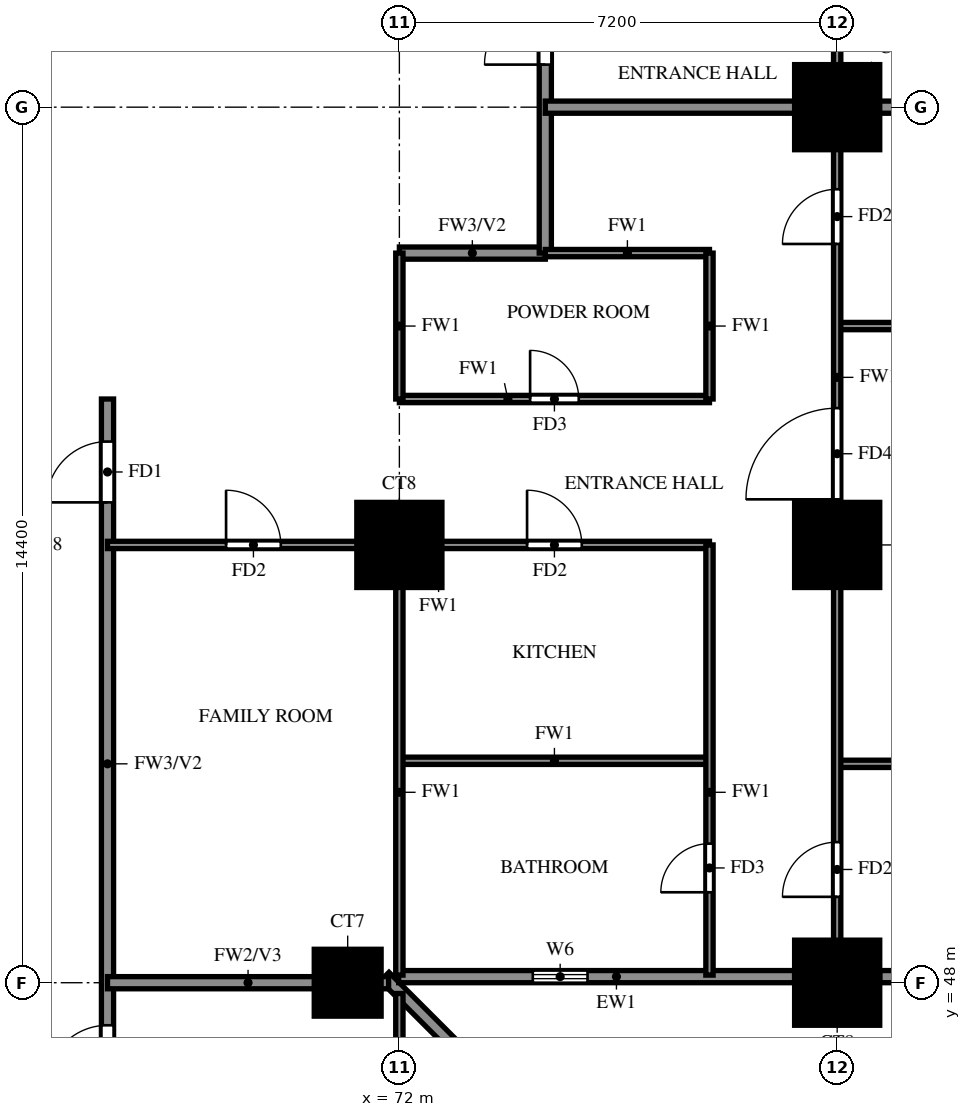
"""IFC4 building model, lengths in metres.
Left out: names, types, materials, properties, quantities, classifications, styles, units other than length and angle.
Written with IfcOpenShell. Run it as: python <this file> out.ifc"""

import sys

from ifc_helpers import new_model, si_unit, direction, frame, frame_2d, origin, origin_2d, place, context, subcontext, project, spatial, rectangle, extrude, source, transform, mapped, element, fill, save


model = new_model("IFC4")
c1 = context("Model", 3, precision=1e-05, world=origin(), true_north=direction((0.0, 1.0)))
c2 = subcontext(c1, "Body", "Model", "MODEL_VIEW")
j1 = project(units=[si_unit("LENGTHUNIT", "METRE"), si_unit("PLANEANGLEUNIT", "RADIAN")], contexts=[c1])
p1 = place(None, origin())
s1 = spatial("IfcSite", under=j1, at=p1, CompositionType="ELEMENT")
p2 = place(p1, origin())
s2 = spatial("IfcBuilding", under=s1, at=p2, CompositionType="ELEMENT")
p3 = place(p2, frame((0.0, 0.0, 44.5)))
s3 = spatial("IfcBuildingStorey", under=s2, at=p3, CompositionType="ELEMENT", Elevation=44.5)
m1 = source(origin(), c2, "Body", "SweptSolid", [
    extrude(rectangle(XDim=1.1, YDim=1.1, at=origin_2d()), origin(), (0.0, 0.0, 1.0), 3.18),
])
p4 = place(p3, frame((71.15, 48.0, 0.0), z_axis=(0.0, 0.0, 1.0), x_axis=(1.0, 0.0, 0.0)))
e1 = element("IfcColumn", 1, at=p4, inside=s3, PredefinedType="COLUMN", context=c2, shape_type="MappedRepresentation", body=[
    mapped(m1, transform((0.0, 0.0, 0.0))),
])
m2 = source(origin(), c2, "Body", "SweptSolid", [
    extrude(rectangle(XDim=1.4, YDim=1.4, at=origin_2d()), origin(), (0.0, 0.0, 1.0), 3.18),
])
for number, where, z_axis, x_axis in (
    (2, (79.2, 48.0, 0.0), (0.0, 0.0, 1.0), (1.0, 0.0, 0.0)),
    (3, (72.0, 55.2, 0.0), (0.0, 0.0, 1.0), (1.0, 0.0, 0.0)),
    (4, (79.2, 55.2, 0.0), (0.0, 0.0, 1.0), (1.0, 0.0, 0.0)),
    (5, (79.2, 62.4, 0.0), (0.0, 0.0, 1.0), (1.0, 0.0, 0.0)),
):
    element("IfcColumn", number, at=place(p3, frame(where, z_axis=z_axis, x_axis=x_axis)), inside=s3, PredefinedType="COLUMN", context=c2, shape_type="MappedRepresentation", body=[
        mapped(m2, transform((0.0, 0.0, 0.0))),
    ])
p5 = place(p3, frame((78.74, 41.118, 0.0), z_axis=(0.0, 0.0, 1.0), x_axis=(-0.707106781187, 0.707106781187, 0.0)))
e6 = element("IfcWall", 6, at=p5, inside=s3, PredefinedType="SOLIDWALL", context=c2, shape_type="SweptSolid", body=[
    extrude(rectangle(XDim=9.874, YDim=0.2, at=frame_2d((4.937, 0.0))), origin(), (0.0, 0.0, 1.0), 3.18),
])
p6 = place(p3, frame((71.989, 48.1, 0.0), z_axis=(0.0, 0.0, 1.0), x_axis=(1.0, 0.0, 0.0)))
e7 = element("IfcWall", 7, at=p6, inside=s3, PredefinedType="SOLIDWALL", context=c2, shape_type="SweptSolid", body=[
    extrude(rectangle(XDim=6.511, YDim=0.2, at=frame_2d((3.256, 0.0))), origin(), (0.0, 0.0, 1.0), 3.18),
])
p7 = place(p6, frame((2.206, 0.0, 1.5)))
e8 = element("IfcOpeningElement", 8, at=p7, cuts=e7, PredefinedType="OPENING", context=c2, shape_type="SweptSolid", body=[
    extrude(rectangle(XDim=0.9, YDim=0.9, at=frame_2d((0.45, 0.45))), frame((0.0, 0.11, 0.0), z_axis=(0.0, -1.0, 0.0), x_axis=(1.0, 0.0, 0.0)), (0.0, 0.0, 1.0), 0.22),
])
p8 = place(p3, frame((79.9, 48.1, 0.0), z_axis=(0.0, 0.0, 1.0), x_axis=(1.0, 0.0, 0.0)))
e9 = element("IfcWall", 9, at=p8, inside=s3, PredefinedType="SOLIDWALL", context=c2, shape_type="SweptSolid", body=[
    extrude(rectangle(XDim=5.35, YDim=0.2, at=frame_2d((2.675, 0.0))), origin(), (0.0, 0.0, 1.0), 3.18),
])
p9 = place(p8, frame((1.475, 0.0, 0.6)))
e10 = element("IfcOpeningElement", 10, at=p9, cuts=e9, PredefinedType="OPENING", context=c2, shape_type="SweptSolid", body=[
    extrude(rectangle(XDim=2.4, YDim=2.4, at=frame_2d((1.2, 1.2))), frame((0.0, 0.11, 0.0), z_axis=(0.0, -1.0, 0.0), x_axis=(1.0, 0.0, 0.0)), (0.0, 0.0, 1.0), 0.22),
])
p10 = place(p3, frame((72.0, 60.0, 0.0), z_axis=(0.0, 0.0, 1.0), x_axis=(1.0, 0.0, 0.0)))
e11 = element("IfcWall", 11, at=p10, inside=s3, PredefinedType="SOLIDWALL", context=c2, shape_type="SweptSolid", body=[
    extrude(rectangle(XDim=2.4, YDim=0.2, at=frame_2d((1.2, 0.0))), origin(), (0.0, 0.0, 1.0), 3.18),
])
p11 = place(p3, frame((67.2, 45.6, 0.0), z_axis=(0.0, 0.0, 1.0), x_axis=(0.0, 1.0, 0.0)))
e12 = element("IfcWall", 12, at=p11, inside=s3, PredefinedType="SOLIDWALL", context=c2, shape_type="SweptSolid", body=[
    extrude(rectangle(XDim=12.0, YDim=0.2, at=frame_2d((6.0, 0.0))), origin(), (0.0, 0.0, 1.0), 3.18),
])
p12 = place(p11, frame((10.3, 0.0, 0.0)))
e13 = element("IfcOpeningElement", 13, at=p12, cuts=e12, PredefinedType="OPENING", context=c2, shape_type="SweptSolid", body=[
    extrude(rectangle(XDim=1.0, YDim=2.1, at=frame_2d((0.5, 1.05))), frame((0.0, 0.11, 0.0), z_axis=(0.0, -1.0, 0.0), x_axis=(1.0, 0.0, 0.0)), (0.0, 0.0, 1.0), 0.22),
])
p13 = place(p11, frame((0.7, 0.0, 0.0)))
e14 = element("IfcOpeningElement", 14, at=p13, cuts=e12, PredefinedType="OPENING", context=c2, shape_type="SweptSolid", body=[
    extrude(rectangle(XDim=1.0, YDim=2.1, at=frame_2d((0.5, 1.05))), frame((0.0, 0.11, 0.0), z_axis=(0.0, -1.0, 0.0), x_axis=(1.0, 0.0, 0.0)), (0.0, 0.0, 1.0), 0.22),
])
p14 = place(p3, frame((74.4, 60.0, 0.0), z_axis=(0.0, 0.0, 1.0), x_axis=(0.0, 1.0, 0.0)))
e15 = element("IfcWall", 15, at=p14, inside=s3, PredefinedType="SOLIDWALL", context=c2, shape_type="SweptSolid", body=[
    extrude(rectangle(XDim=9.45, YDim=0.2, at=frame_2d((4.725, 0.0))), origin(), (0.0, 0.0, 1.0), 3.18),
])
p15 = place(p14, frame((3.1, 0.0, 0.0)))
e16 = element("IfcOpeningElement", 16, at=p15, cuts=e15, PredefinedType="OPENING", context=c2, shape_type="SweptSolid", body=[
    extrude(rectangle(XDim=1.0, YDim=2.1, at=frame_2d((0.5, 1.05))), frame((0.0, 0.11, 0.0), z_axis=(0.0, -1.0, 0.0), x_axis=(1.0, 0.0, 0.0)), (0.0, 0.0, 1.0), 0.22),
])
p16 = place(p3, frame((67.2, 48.0, 0.0), z_axis=(0.0, 0.0, 1.0), x_axis=(1.0, 0.0, 0.0)))
e17 = element("IfcWall", 17, at=p16, inside=s3, PredefinedType="SOLIDWALL", context=c2, shape_type="SweptSolid", body=[
    extrude(rectangle(XDim=4.623, YDim=0.2, at=frame_2d((2.312, 0.0))), origin(), (0.0, 0.0, 1.0), 3.18),
])
p17 = place(p3, frame((74.4, 62.4, 0.0), z_axis=(0.0, 0.0, 1.0), x_axis=(1.0, 0.0, 0.0)))
e18 = element("IfcWall", 18, at=p17, inside=s3, PredefinedType="SOLIDWALL", context=c2, shape_type="SweptSolid", body=[
    extrude(rectangle(XDim=11.875, YDim=0.2, at=frame_2d((5.938, 0.0))), origin(), (0.0, 0.0, 1.0), 3.18),
])
p18 = place(p3, frame((79.2, 51.6, 0.0), z_axis=(0.0, 0.0, 1.0), x_axis=(1.0, 0.0, 0.0)))
e19 = element("IfcWall", 19, at=p18, inside=s3, PredefinedType="PARTITIONING", context=c2, shape_type="SweptSolid", body=[
    extrude(rectangle(XDim=7.075, YDim=0.12, at=frame_2d((3.538, 0.0))), origin(), (0.0, 0.0, 1.0), 2.28),
])
p19 = place(p3, frame((72.0, 51.65, 0.0), z_axis=(0.0, 0.0, 1.0), x_axis=(1.0, 0.0, 0.0)))
e20 = element("IfcWall", 20, at=p19, inside=s3, PredefinedType="PARTITIONING", context=c2, shape_type="SweptSolid", body=[
    extrude(rectangle(XDim=5.1, YDim=0.12, at=frame_2d((2.55, 0.0))), origin(), (0.0, 0.0, 1.0), 3.18),
])
p20 = place(p3, frame((67.2, 55.2, 0.0), z_axis=(0.0, 0.0, 1.0), x_axis=(1.0, 0.0, 0.0)))
e21 = element("IfcWall", 21, at=p20, inside=s3, PredefinedType="PARTITIONING", context=c2, shape_type="SweptSolid", body=[
    extrude(rectangle(XDim=9.9, YDim=0.12, at=frame_2d((4.95, 0.0))), origin(), (0.0, 0.0, 1.0), 3.18),
])
p21 = place(p20, frame((6.9, 0.0, 0.0)))
e22 = element("IfcOpeningElement", 22, at=p21, cuts=e21, PredefinedType="OPENING", context=c2, shape_type="SweptSolid", body=[
    extrude(rectangle(XDim=0.9, YDim=2.1, at=frame_2d((0.45, 1.05))), frame((0.0, 0.07, 0.0), z_axis=(0.0, -1.0, 0.0), x_axis=(1.0, 0.0, 0.0)), (0.0, 0.0, 1.0), 0.14),
])
p22 = place(p20, frame((1.95, 0.0, 0.0)))
e23 = element("IfcOpeningElement", 23, at=p22, cuts=e21, PredefinedType="OPENING", context=c2, shape_type="SweptSolid", body=[
    extrude(rectangle(XDim=0.9, YDim=2.1, at=frame_2d((0.45, 1.05))), frame((0.0, 0.07, 0.0), z_axis=(0.0, -1.0, 0.0), x_axis=(1.0, 0.0, 0.0)), (0.0, 0.0, 1.0), 0.14),
])
p23 = place(p3, frame((72.0, 57.6, 0.0), z_axis=(0.0, 0.0, 1.0), x_axis=(1.0, 0.0, 0.0)))
e24 = element("IfcWall", 24, at=p23, inside=s3, PredefinedType="PARTITIONING", context=c2, shape_type="SweptSolid", body=[
    extrude(rectangle(XDim=5.1, YDim=0.12, at=frame_2d((2.55, 0.0))), origin(), (0.0, 0.0, 1.0), 3.18),
])
p24 = place(p23, frame((2.15, 0.0, 0.0)))
e25 = element("IfcOpeningElement", 25, at=p24, cuts=e24, PredefinedType="OPENING", context=c2, shape_type="SweptSolid", body=[
    extrude(rectangle(XDim=0.8, YDim=2.1, at=frame_2d((0.4, 1.05))), frame((0.0, 0.07, 0.0), z_axis=(0.0, -1.0, 0.0), x_axis=(1.0, 0.0, 0.0)), (0.0, 0.0, 1.0), 0.14),
])
p25 = place(p3, frame((79.2, 58.8, 0.0), z_axis=(0.0, 0.0, 1.0), x_axis=(1.0, 0.0, 0.0)))
e26 = element("IfcWall", 26, at=p25, inside=s3, PredefinedType="PARTITIONING", context=c2, shape_type="SweptSolid", body=[
    extrude(rectangle(XDim=7.075, YDim=0.12, at=frame_2d((3.538, 0.0))), origin(), (0.0, 0.0, 1.0), 2.28),
])
p26 = place(p3, frame((74.4, 60.0, 0.0), z_axis=(0.0, 0.0, 1.0), x_axis=(1.0, 0.0, 0.0)))
e27 = element("IfcWall", 27, at=p26, inside=s3, PredefinedType="PARTITIONING", context=c2, shape_type="SweptSolid", body=[
    extrude(rectangle(XDim=2.7, YDim=0.12, at=frame_2d((1.35, 0.0))), origin(), (0.0, 0.0, 1.0), 3.18),
])
p27 = place(p3, frame((72.0, 33.725, 0.0), z_axis=(0.0, 0.0, 1.0), x_axis=(0.0, 1.0, 0.0)))
e28 = element("IfcWall", 28, at=p27, inside=s3, PredefinedType="PARTITIONING", context=c2, shape_type="SweptSolid", body=[
    extrude(rectangle(XDim=14.098, YDim=0.12, at=frame_2d((7.049, 0.0))), origin(), (0.0, 0.0, 1.0), 2.28),
])
p28 = place(p27, frame((10.075, 0.0, 0.0)))
e29 = element("IfcOpeningElement", 29, at=p28, cuts=e28, PredefinedType="OPENING", context=c2, shape_type="SweptSolid", body=[
    extrude(rectangle(XDim=0.9, YDim=2.1, at=frame_2d((0.45, 1.05))), frame((0.0, 0.07, 0.0), z_axis=(0.0, -1.0, 0.0), x_axis=(1.0, 0.0, 0.0)), (0.0, 0.0, 1.0), 0.14),
])
p29 = place(p3, frame((72.0, 48.125, 0.0), z_axis=(0.0, 0.0, 1.0), x_axis=(0.0, 1.0, 0.0)))
e30 = element("IfcWall", 30, at=p29, inside=s3, PredefinedType="PARTITIONING", context=c2, shape_type="SweptSolid", body=[
    extrude(rectangle(XDim=7.075, YDim=0.12, at=frame_2d((3.538, 0.0))), origin(), (0.0, 0.0, 1.0), 3.18),
])
p30 = place(p3, frame((72.0, 57.6, 0.0), z_axis=(0.0, 0.0, 1.0), x_axis=(0.0, 1.0, 0.0)))
e31 = element("IfcWall", 31, at=p30, inside=s3, PredefinedType="PARTITIONING", context=c2, shape_type="SweptSolid", body=[
    extrude(rectangle(XDim=2.4, YDim=0.12, at=frame_2d((1.2, 0.0))), origin(), (0.0, 0.0, 1.0), 3.18),
])
p31 = place(p3, frame((77.1, 48.125, 0.0), z_axis=(0.0, 0.0, 1.0), x_axis=(0.0, 1.0, 0.0)))
e32 = element("IfcWall", 32, at=p31, inside=s3, PredefinedType="PARTITIONING", context=c2, shape_type="SweptSolid", body=[
    extrude(rectangle(XDim=7.075, YDim=0.12, at=frame_2d((3.538, 0.0))), origin(), (0.0, 0.0, 1.0), 3.18),
])
p32 = place(p31, frame((1.363, 0.0, 0.0)))
e33 = element("IfcOpeningElement", 33, at=p32, cuts=e32, PredefinedType="OPENING", context=c2, shape_type="SweptSolid", body=[
    extrude(rectangle(XDim=0.8, YDim=2.1, at=frame_2d((0.4, 1.05))), frame((0.0, 0.07, 0.0), z_axis=(0.0, -1.0, 0.0), x_axis=(1.0, 0.0, 0.0)), (0.0, 0.0, 1.0), 0.14),
])
p33 = place(p3, frame((77.1, 57.6, 0.0), z_axis=(0.0, 0.0, 1.0), x_axis=(0.0, 1.0, 0.0)))
e34 = element("IfcWall", 34, at=p33, inside=s3, PredefinedType="PARTITIONING", context=c2, shape_type="SweptSolid", body=[
    extrude(rectangle(XDim=2.4, YDim=0.12, at=frame_2d((1.2, 0.0))), origin(), (0.0, 0.0, 1.0), 3.18),
])
p34 = place(p3, frame((79.2, 48.125, 0.0), z_axis=(0.0, 0.0, 1.0), x_axis=(0.0, 1.0, 0.0)))
e35 = element("IfcWall", 35, at=p34, inside=s3, PredefinedType="PARTITIONING", context=c2, shape_type="SweptSolid", body=[
    extrude(rectangle(XDim=17.875, YDim=0.12, at=frame_2d((8.938, 0.0))), origin(), (0.0, 0.0, 1.0), 3.18),
])
p35 = place(p34, frame((1.288, 0.0, 0.0)))
e36 = element("IfcOpeningElement", 36, at=p35, cuts=e35, PredefinedType="OPENING", context=c2, shape_type="SweptSolid", body=[
    extrude(rectangle(XDim=0.9, YDim=2.1, at=frame_2d((0.45, 1.05))), frame((0.0, 0.07, 0.0), z_axis=(0.0, -1.0, 0.0), x_axis=(1.0, 0.0, 0.0)), (0.0, 0.0, 1.0), 0.14),
])
p36 = place(p34, frame((7.825, 0.0, 0.0)))
e37 = element("IfcOpeningElement", 37, at=p36, cuts=e35, PredefinedType="OPENING", context=c2, shape_type="SweptSolid", body=[
    extrude(rectangle(XDim=1.5, YDim=2.1, at=frame_2d((0.75, 1.05))), frame((0.0, 0.07, 0.0), z_axis=(0.0, -1.0, 0.0), x_axis=(1.0, 0.0, 0.0)), (0.0, 0.0, 1.0), 0.14),
])
p37 = place(p34, frame((12.025, 0.0, 0.0)))
e38 = element("IfcOpeningElement", 38, at=p37, cuts=e35, PredefinedType="OPENING", context=c2, shape_type="SweptSolid", body=[
    extrude(rectangle(XDim=0.9, YDim=2.1, at=frame_2d((0.45, 1.05))), frame((0.0, 0.07, 0.0), z_axis=(0.0, -1.0, 0.0), x_axis=(1.0, 0.0, 0.0)), (0.0, 0.0, 1.0), 0.14),
])
p38 = place(p34, frame((15.625, 0.0, 0.0)))
e39 = element("IfcOpeningElement", 39, at=p38, cuts=e35, PredefinedType="OPENING", context=c2, shape_type="SweptSolid", body=[
    extrude(rectangle(XDim=0.9, YDim=2.1, at=frame_2d((0.45, 1.05))), frame((0.0, 0.07, 0.0), z_axis=(0.0, -1.0, 0.0), x_axis=(1.0, 0.0, 0.0)), (0.0, 0.0, 1.0), 0.14),
])
p39 = place(p7, origin())
e40 = element("IfcWindow", 40, at=p39, inside=s3, PartitioningType="SINGLE_PANEL", PredefinedType="WINDOW", context=c2, shape_type="SweptSolid", body=[
    extrude(rectangle(XDim=0.9, YDim=0.9, at=frame_2d((0.45, 0.45))), frame((0.0, 0.03, 0.0), z_axis=(0.0, -1.0, 0.0), x_axis=(1.0, 0.0, 0.0)), (0.0, 0.0, 1.0), 0.06),
])
fill(e8, e40)
p40 = place(p12, origin())
e41 = element("IfcDoor", 41, at=p40, inside=s3, OperationType="SINGLE_SWING_LEFT", PredefinedType="DOOR", context=c2, shape_type="SweptSolid", body=[
    extrude(rectangle(XDim=1.0, YDim=2.1, at=frame_2d((0.5, 1.05))), frame((0.0, 0.025, 0.0), z_axis=(0.0, -1.0, 0.0), x_axis=(1.0, 0.0, 0.0)), (0.0, 0.0, 1.0), 0.05),
])
fill(e13, e41)
p41 = place(p35, origin())
e42 = element("IfcDoor", 42, at=p41, inside=s3, OperationType="SINGLE_SWING_LEFT", PredefinedType="DOOR", context=c2, shape_type="SweptSolid", body=[
    extrude(rectangle(XDim=0.9, YDim=2.1, at=frame_2d((0.45, 1.05))), frame((0.0, 0.025, 0.0), z_axis=(0.0, -1.0, 0.0), x_axis=(1.0, 0.0, 0.0)), (0.0, 0.0, 1.0), 0.05),
])
fill(e36, e42)
p42 = place(p36, origin())
e43 = element("IfcDoor", 43, at=p42, inside=s3, OperationType="SINGLE_SWING_LEFT", PredefinedType="DOOR", context=c2, shape_type="SweptSolid", body=[
    extrude(rectangle(XDim=1.5, YDim=2.1, at=frame_2d((0.75, 1.05))), frame((0.0, 0.025, 0.0), z_axis=(0.0, -1.0, 0.0), x_axis=(1.0, 0.0, 0.0)), (0.0, 0.0, 1.0), 0.05),
])
fill(e37, e43)
p43 = place(p37, origin())
e44 = element("IfcDoor", 44, at=p43, inside=s3, OperationType="SINGLE_SWING_LEFT", PredefinedType="DOOR", context=c2, shape_type="SweptSolid", body=[
    extrude(rectangle(XDim=0.9, YDim=2.1, at=frame_2d((0.45, 1.05))), frame((0.0, 0.025, 0.0), z_axis=(0.0, -1.0, 0.0), x_axis=(1.0, 0.0, 0.0)), (0.0, 0.0, 1.0), 0.05),
])
fill(e38, e44)
p44 = place(p32, origin())
e45 = element("IfcDoor", 45, at=p44, inside=s3, OperationType="SINGLE_SWING_LEFT", PredefinedType="DOOR", context=c2, shape_type="SweptSolid", body=[
    extrude(rectangle(XDim=0.8, YDim=2.1, at=frame_2d((0.4, 1.05))), frame((0.0, 0.025, 0.0), z_axis=(0.0, -1.0, 0.0), x_axis=(1.0, 0.0, 0.0)), (0.0, 0.0, 1.0), 0.05),
])
fill(e33, e45)
p45 = place(p21, origin())
e46 = element("IfcDoor", 46, at=p45, inside=s3, OperationType="SINGLE_SWING_RIGHT", PredefinedType="DOOR", context=c2, shape_type="SweptSolid", body=[
    extrude(rectangle(XDim=0.9, YDim=2.1, at=frame_2d((0.45, 1.05))), frame((0.0, 0.025, 0.0), z_axis=(0.0, -1.0, 0.0), x_axis=(1.0, 0.0, 0.0)), (0.0, 0.0, 1.0), 0.05),
])
fill(e22, e46)
p46 = place(p24, origin())
e47 = element("IfcDoor", 47, at=p46, inside=s3, OperationType="SINGLE_SWING_LEFT", PredefinedType="DOOR", context=c2, shape_type="SweptSolid", body=[
    extrude(rectangle(XDim=0.8, YDim=2.1, at=frame_2d((0.4, 1.05))), frame((0.0, 0.025, 0.0), z_axis=(0.0, -1.0, 0.0), x_axis=(1.0, 0.0, 0.0)), (0.0, 0.0, 1.0), 0.05),
])
fill(e25, e47)
p47 = place(p22, origin())
e48 = element("IfcDoor", 48, at=p47, inside=s3, OperationType="SINGLE_SWING_LEFT", PredefinedType="DOOR", context=c2, shape_type="SweptSolid", body=[
    extrude(rectangle(XDim=0.9, YDim=2.1, at=frame_2d((0.45, 1.05))), frame((0.0, 0.025, 0.0), z_axis=(0.0, -1.0, 0.0), x_axis=(1.0, 0.0, 0.0)), (0.0, 0.0, 1.0), 0.05),
])
fill(e23, e48)
p48 = place(p15, origin())
e49 = element("IfcDoor", 49, at=p48, inside=s3, OperationType="SINGLE_SWING_LEFT", PredefinedType="DOOR", context=c2, shape_type="SweptSolid", body=[
    extrude(rectangle(XDim=1.0, YDim=2.1, at=frame_2d((0.5, 1.05))), frame((0.0, 0.025, 0.0), z_axis=(0.0, -1.0, 0.0), x_axis=(1.0, 0.0, 0.0)), (0.0, 0.0, 1.0), 0.05),
])
fill(e16, e49)
p49 = place(p13, origin())
e50 = element("IfcDoor", 50, at=p49, inside=s3, OperationType="SINGLE_SWING_LEFT", PredefinedType="DOOR", context=c2, shape_type="SweptSolid", body=[
    extrude(rectangle(XDim=1.0, YDim=2.1, at=frame_2d((0.5, 1.05))), frame((0.0, 0.025, 0.0), z_axis=(0.0, -1.0, 0.0), x_axis=(1.0, 0.0, 0.0)), (0.0, 0.0, 1.0), 0.05),
])
fill(e14, e50)
save(model, sys.argv[1])
